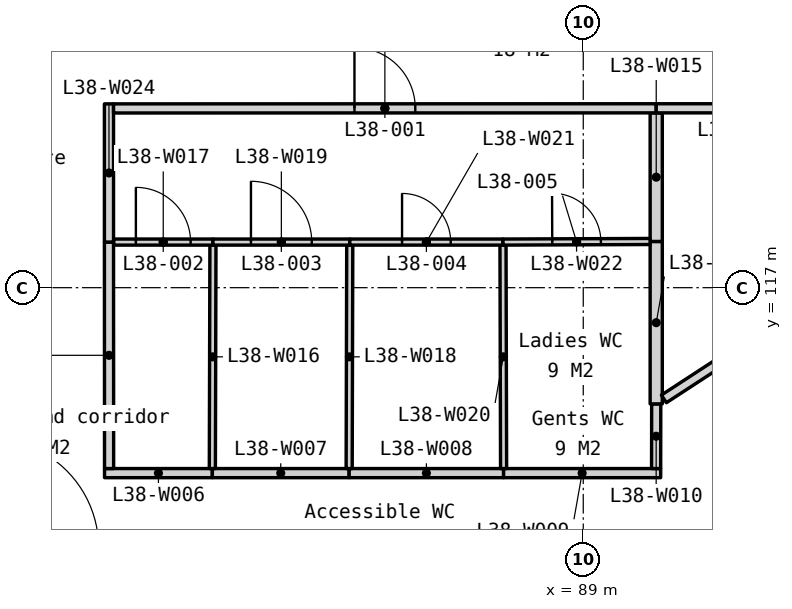
"""IFC4 building model, lengths in metres.
Left out: names, types, materials, properties, quantities, classifications, styles, units other than length and angle.
Written with IfcOpenShell. Run it as: python <this file> out.ifc"""

import sys

from ifc_helpers import new_model, si_unit, direction, frame, frame_2d, origin, place, context, subcontext, project, spatial, polyline, rectangle, outline, extrude, element, fill, save


model = new_model("IFC4")
c1 = context("Model", 3, precision=1e-05, world=origin(), true_north=direction((0.0, 1.0)))
c2 = subcontext(c1, "Body", "Model", "MODEL_VIEW")
j1 = project(units=[si_unit("LENGTHUNIT", "METRE"), si_unit("PLANEANGLEUNIT", "RADIAN")], contexts=[c1])
p1 = place(None, origin())
s1 = spatial("IfcSite", under=j1, at=p1, CompositionType="ELEMENT")
p2 = place(p1, origin())
s2 = spatial("IfcBuilding", under=s1, at=p2, CompositionType="ELEMENT")
p3 = place(p2, frame((0.0, 0.0, 152.0)))
s3 = spatial("IfcBuildingStorey", under=s2, at=p3, CompositionType="ELEMENT", Elevation=152.0)
p4 = place(p3, frame((82.105, 96.067, -0.15), z_axis=(0.0, 0.0, 1.0), x_axis=(0.499997369791, 0.866026922331, 0.0)))
e1 = element("IfcWall", 1, at=p4, inside=s3, PredefinedType="SOLIDWALL", context=c2, shape_type="SweptSolid", body=[
    extrude(outline(polyline([(40.486, 0.0), (40.486, 3.9), (0.0, 3.9), (0.0, 0.0), (40.486, 0.0)])), frame((0.0, 0.225, 0.0), z_axis=(0.0, -1.0, 0.0), x_axis=(1.0, 0.0, 0.0)), (0.0, 0.0, 1.0), 0.45),
])
p5 = place(p4, frame((0.87, 0.0, 0.95)))
e2 = element("IfcOpeningElement", 2, at=p5, cuts=e1, PredefinedType="OPENING", context=c2, shape_type="SweptSolid", body=[
    extrude(rectangle(XDim=1.2, YDim=2.2, at=frame_2d((0.6, 1.1))), frame((0.0, 0.235, 0.0), z_axis=(0.0, -1.0, 0.0), x_axis=(1.0, 0.0, 0.0)), (0.0, 0.0, 1.0), 0.47),
])
p6 = place(p4, frame((8.072, 0.0, 0.95)))
e3 = element("IfcOpeningElement", 3, at=p6, cuts=e1, PredefinedType="OPENING", context=c2, shape_type="SweptSolid", body=[
    extrude(rectangle(XDim=1.8, YDim=2.2, at=frame_2d((0.9, 1.1))), frame((0.0, 0.235, 0.0), z_axis=(0.0, -1.0, 0.0), x_axis=(1.0, 0.0, 0.0)), (0.0, 0.0, 1.0), 0.47),
])
p7 = place(p4, frame((10.372, 0.0, 0.95)))
e4 = element("IfcOpeningElement", 4, at=p7, cuts=e1, PredefinedType="OPENING", context=c2, shape_type="SweptSolid", body=[
    extrude(rectangle(XDim=1.8, YDim=2.2, at=frame_2d((0.9, 1.1))), frame((0.0, 0.235, 0.0), z_axis=(0.0, -1.0, 0.0), x_axis=(1.0, 0.0, 0.0)), (0.0, 0.0, 1.0), 0.47),
])
p8 = place(p4, frame((18.193, 0.0, 0.95)))
e5 = element("IfcOpeningElement", 5, at=p8, cuts=e1, PredefinedType="OPENING", context=c2, shape_type="SweptSolid", body=[
    extrude(rectangle(XDim=1.8, YDim=2.2, at=frame_2d((0.9, 1.1))), frame((0.0, 0.235, 0.0), z_axis=(0.0, -1.0, 0.0), x_axis=(1.0, 0.0, 0.0)), (0.0, 0.0, 1.0), 0.47),
])
p9 = place(p4, frame((20.493, 0.0, 0.95)))
e6 = element("IfcOpeningElement", 6, at=p9, cuts=e1, PredefinedType="OPENING", context=c2, shape_type="SweptSolid", body=[
    extrude(rectangle(XDim=1.8, YDim=2.2, at=frame_2d((0.9, 1.1))), frame((0.0, 0.235, 0.0), z_axis=(0.0, -1.0, 0.0), x_axis=(1.0, 0.0, 0.0)), (0.0, 0.0, 1.0), 0.47),
])
p10 = place(p4, frame((28.315, 0.0, 0.95)))
e7 = element("IfcOpeningElement", 7, at=p10, cuts=e1, PredefinedType="OPENING", context=c2, shape_type="SweptSolid", body=[
    extrude(rectangle(XDim=1.8, YDim=2.2, at=frame_2d((0.9, 1.1))), frame((0.0, 0.235, 0.0), z_axis=(0.0, -1.0, 0.0), x_axis=(1.0, 0.0, 0.0)), (0.0, 0.0, 1.0), 0.47),
])
p11 = place(p4, frame((30.615, 0.0, 0.95)))
e8 = element("IfcOpeningElement", 8, at=p11, cuts=e1, PredefinedType="OPENING", context=c2, shape_type="SweptSolid", body=[
    extrude(rectangle(XDim=1.8, YDim=2.2, at=frame_2d((0.9, 1.1))), frame((0.0, 0.235, 0.0), z_axis=(0.0, -1.0, 0.0), x_axis=(1.0, 0.0, 0.0)), (0.0, 0.0, 1.0), 0.47),
])
p12 = place(p4, frame((38.417, 0.0, 0.95)))
e9 = element("IfcOpeningElement", 9, at=p12, cuts=e1, PredefinedType="OPENING", context=c2, shape_type="SweptSolid", body=[
    extrude(rectangle(XDim=1.2, YDim=2.2, at=frame_2d((0.6, 1.1))), frame((0.0, 0.235, 0.0), z_axis=(0.0, -1.0, 0.0), x_axis=(1.0, 0.0, 0.0)), (0.0, 0.0, 1.0), 0.47),
])
p13 = place(p3, frame((81.127, 113.95, 0.0), z_axis=(0.0, 0.0, 1.0), x_axis=(1.0, 0.0, 0.0)))
e10 = element("IfcWall", 10, at=p13, inside=s3, PredefinedType="PARTITIONING", context=c2, shape_type="SweptSolid", body=[
    extrude(rectangle(XDim=1.773, YDim=0.15, at=frame_2d((0.886, 0.0))), origin(), (0.0, 0.0, 1.0), 3.75),
])
p14 = place(p3, frame((82.9, 113.95, 0.0), z_axis=(0.0, 0.0, 1.0), x_axis=(1.0, 0.0, 0.0)))
e11 = element("IfcWall", 11, at=p14, inside=s3, PredefinedType="PARTITIONING", context=c2, shape_type="SweptSolid", body=[
    extrude(rectangle(XDim=2.25, YDim=0.15, at=frame_2d((1.125, 0.0))), origin(), (0.0, 0.0, 1.0), 3.75),
])
p15 = place(p3, frame((85.15, 113.95, 0.0), z_axis=(0.0, 0.0, 1.0), x_axis=(1.0, 0.0, 0.0)))
e12 = element("IfcWall", 12, at=p15, inside=s3, PredefinedType="PARTITIONING", context=c2, shape_type="SweptSolid", body=[
    extrude(rectangle(XDim=2.54, YDim=0.15, at=frame_2d((1.27, 0.0))), origin(), (0.0, 0.0, 1.0), 3.75),
])
p16 = place(p3, frame((87.69, 113.95, 0.0), z_axis=(0.0, 0.0, 1.0), x_axis=(1.0, 0.0, 0.0)))
e13 = element("IfcWall", 13, at=p16, inside=s3, PredefinedType="PARTITIONING", context=c2, shape_type="SweptSolid", body=[
    extrude(rectangle(XDim=2.583, YDim=0.15, at=frame_2d((1.292, 0.0))), origin(), (0.0, 0.0, 1.0), 3.75),
])
p17 = place(p3, frame((90.198, 114.025, 0.0), z_axis=(0.0, 0.0, 1.0), x_axis=(0.001606976805, 0.999998708812, 0.0)))
e14 = element("IfcWall", 14, at=p17, inside=s3, PredefinedType="PARTITIONING", context=c2, shape_type="SweptSolid", body=[
    extrude(rectangle(XDim=1.063, YDim=0.15, at=frame_2d((0.532, 0.0))), origin(), (0.0, 0.0, 1.0), 3.75),
])
p18 = place(p3, frame((90.2, 115.088, 0.0), z_axis=(0.0, 0.0, 1.0), x_axis=(0.0, 1.0, 0.0)))
e15 = element("IfcWall", 15, at=p18, inside=s3, PredefinedType="PARTITIONING", context=c2, shape_type="SweptSolid", body=[
    extrude(rectangle(XDim=2.672, YDim=0.2, at=frame_2d((1.336, 0.0))), origin(), (0.0, 0.0, 1.0), 3.75),
])
p19 = place(p3, frame((90.326, 115.17, 0.0), z_axis=(0.0, 0.0, 1.0), x_axis=(0.837619592687, 0.546253986665, 0.0)))
e16 = element("IfcWall", 16, at=p19, inside=s3, PredefinedType="PARTITIONING", context=c2, shape_type="SweptSolid", body=[
    extrude(rectangle(XDim=4.859, YDim=0.15, at=frame_2d((2.43, 0.0))), origin(), (0.0, 0.0, 1.0), 3.75),
])
p20 = place(p19, frame((1.93, 0.0, 0.0)))
e17 = element("IfcOpeningElement", 17, at=p20, cuts=e16, PredefinedType="OPENING", context=c2, shape_type="SweptSolid", body=[
    extrude(rectangle(XDim=1.0, YDim=2.1, at=frame_2d((0.5, 1.05))), frame((0.0, 0.085, 0.0), z_axis=(0.0, -1.0, 0.0), x_axis=(1.0, 0.0, 0.0)), (0.0, 0.0, 1.0), 0.17),
])
p21 = place(p3, frame((90.2, 117.76, 0.0), z_axis=(0.0, 0.0, 1.0), x_axis=(0.0, 1.0, 0.0)))
e18 = element("IfcWall", 18, at=p21, inside=s3, PredefinedType="PARTITIONING", context=c2, shape_type="SweptSolid", body=[
    extrude(rectangle(XDim=2.115, YDim=0.2, at=frame_2d((1.058, 0.0))), origin(), (0.0, 0.0, 1.0), 3.75),
])
p22 = place(p3, frame((82.9, 114.025, 0.0), z_axis=(0.0, 0.0, 1.0), x_axis=(0.002657268237, 0.999996469457, 0.0)))
e19 = element("IfcWall", 19, at=p22, inside=s3, PredefinedType="PARTITIONING", context=c2, shape_type="SweptSolid", body=[
    extrude(rectangle(XDim=3.675, YDim=0.1, at=frame_2d((1.837, 0.0))), origin(), (0.0, 0.0, 1.0), 3.75),
])
p23 = place(p3, frame((81.275, 117.75, 0.0), z_axis=(0.0, 0.0, 1.0), x_axis=(1.0, 0.0, 0.0)))
e20 = element("IfcWall", 20, at=p23, inside=s3, PredefinedType="PARTITIONING", context=c2, shape_type="SweptSolid", body=[
    extrude(rectangle(XDim=1.635, YDim=0.1, at=frame_2d((0.817, 0.0))), origin(), (0.0, 0.0, 1.0), 3.75),
])
p24 = place(p23, frame((0.367, 0.0, 0.0)))
e21 = element("IfcOpeningElement", 21, at=p24, cuts=e20, PredefinedType="OPENING", context=c2, shape_type="SweptSolid", body=[
    extrude(rectangle(XDim=0.9, YDim=2.1, at=frame_2d((0.45, 1.05))), frame((0.0, 0.06, 0.0), z_axis=(0.0, -1.0, 0.0), x_axis=(1.0, 0.0, 0.0)), (0.0, 0.0, 1.0), 0.12),
])
p25 = place(p3, frame((85.15, 114.025, 0.0), z_axis=(0.0, 0.0, 1.0), x_axis=(0.002657268237, 0.999996469457, 0.0)))
e22 = element("IfcWall", 22, at=p25, inside=s3, PredefinedType="PARTITIONING", context=c2, shape_type="SweptSolid", body=[
    extrude(rectangle(XDim=3.675, YDim=0.1, at=frame_2d((1.837, 0.0))), origin(), (0.0, 0.0, 1.0), 3.75),
])
p26 = place(p3, frame((82.91, 117.75, 0.0), z_axis=(0.0, 0.0, 1.0), x_axis=(1.0, 0.0, 0.0)))
e23 = element("IfcWall", 23, at=p26, inside=s3, PredefinedType="PARTITIONING", context=c2, shape_type="SweptSolid", body=[
    extrude(rectangle(XDim=2.25, YDim=0.1, at=frame_2d((1.125, 0.0))), origin(), (0.0, 0.0, 1.0), 3.75),
])
p27 = place(p26, frame((0.625, 0.0, 0.0)))
e24 = element("IfcOpeningElement", 24, at=p27, cuts=e23, PredefinedType="OPENING", context=c2, shape_type="SweptSolid", body=[
    extrude(rectangle(XDim=1.0, YDim=2.1, at=frame_2d((0.5, 1.05))), frame((0.0, 0.06, 0.0), z_axis=(0.0, -1.0, 0.0), x_axis=(1.0, 0.0, 0.0)), (0.0, 0.0, 1.0), 0.12),
])
p28 = place(p3, frame((87.69, 114.025, 0.0), z_axis=(0.0, 0.0, 1.0), x_axis=(-0.002590836983, 0.999996643776, 0.0)))
e25 = element("IfcWall", 25, at=p28, inside=s3, PredefinedType="PARTITIONING", context=c2, shape_type="SweptSolid", body=[
    extrude(rectangle(XDim=3.675, YDim=0.1, at=frame_2d((1.837, 0.0))), origin(), (0.0, 0.0, 1.0), 3.75),
])
p29 = place(p3, frame((85.16, 117.75, 0.0), z_axis=(0.0, 0.0, 1.0), x_axis=(1.0, 0.0, 0.0)))
e26 = element("IfcWall", 26, at=p29, inside=s3, PredefinedType="PARTITIONING", context=c2, shape_type="SweptSolid", body=[
    extrude(rectangle(XDim=2.52, YDim=0.1, at=frame_2d((1.26, 0.0))), origin(), (0.0, 0.0, 1.0), 3.75),
])
p30 = place(p29, frame((0.86, 0.0, 0.0)))
e27 = element("IfcOpeningElement", 27, at=p30, cuts=e26, PredefinedType="OPENING", context=c2, shape_type="SweptSolid", body=[
    extrude(rectangle(XDim=0.8, YDim=2.1, at=frame_2d((0.4, 1.05))), frame((0.0, 0.06, 0.0), z_axis=(0.0, -1.0, 0.0), x_axis=(1.0, 0.0, 0.0)), (0.0, 0.0, 1.0), 0.12),
])
p31 = place(p3, frame((87.68, 117.75, 0.0), z_axis=(0.0, 0.0, 1.0), x_axis=(0.999992261016, 0.003934197335, 0.0)))
e28 = element("IfcWall", 28, at=p31, inside=s3, PredefinedType="PARTITIONING", context=c2, shape_type="SweptSolid", body=[
    extrude(rectangle(XDim=2.42, YDim=0.1, at=frame_2d((1.21, 0.0))), origin(), (0.0, 0.0, 1.0), 3.75),
])
p32 = place(p31, frame((0.81, 0.0, 0.0)))
e29 = element("IfcOpeningElement", 29, at=p32, cuts=e28, PredefinedType="OPENING", context=c2, shape_type="SweptSolid", body=[
    extrude(rectangle(XDim=0.8, YDim=2.1, at=frame_2d((0.4, 1.05))), frame((0.0, 0.06, 0.0), z_axis=(0.0, -1.0, 0.0), x_axis=(1.0, 0.0, 0.0)), (0.0, 0.0, 1.0), 0.12),
])
p33 = place(p3, frame((81.202, 114.025, 0.0), z_axis=(0.0, 0.0, 1.0), x_axis=(-0.000524315041, 0.999999862547, 0.0)))
e30 = element("IfcWall", 30, at=p33, inside=s3, PredefinedType="PARTITIONING", context=c2, shape_type="SweptSolid", body=[
    extrude(rectangle(XDim=3.725, YDim=0.15, at=frame_2d((1.863, 0.0))), origin(), (0.0, 0.0, 1.0), 3.75),
])
p34 = place(p3, frame((81.2, 117.75, 0.0), z_axis=(0.0, 0.0, 1.0), x_axis=(0.0, 1.0, 0.0)))
e31 = element("IfcWall", 31, at=p34, inside=s3, PredefinedType="PARTITIONING", context=c2, shape_type="SweptSolid", body=[
    extrude(rectangle(XDim=2.273, YDim=0.15, at=frame_2d((1.136, 0.0))), origin(), (0.0, 0.0, 1.0), 3.75),
])
p35 = place(p3, frame((81.275, 119.948, 0.0), z_axis=(0.0, 0.0, 1.0), x_axis=(0.999999976055, 0.000218836333, 0.0)))
e32 = element("IfcWall", 32, at=p35, inside=s3, PredefinedType="PARTITIONING", context=c2, shape_type="SweptSolid", body=[
    extrude(rectangle(XDim=8.925, YDim=0.15, at=frame_2d((4.462, 0.0))), origin(), (0.0, 0.0, 1.0), 3.75),
])
p36 = place(p35, frame((3.962, 0.0, 0.0)))
e33 = element("IfcOpeningElement", 33, at=p36, cuts=e32, PredefinedType="OPENING", context=c2, shape_type="SweptSolid", body=[
    extrude(rectangle(XDim=1.0, YDim=2.1, at=frame_2d((0.5, 1.05))), frame((0.0, 0.085, 0.0), z_axis=(0.0, -1.0, 0.0), x_axis=(1.0, 0.0, 0.0)), (0.0, 0.0, 1.0), 0.17),
])
p37 = place(p3, frame((90.2, 119.95, 0.0), z_axis=(0.0, 0.0, 1.0), x_axis=(1.0, 0.0, 0.0)))
e34 = element("IfcWall", 34, at=p37, inside=s3, PredefinedType="PARTITIONING", context=c2, shape_type="SweptSolid", body=[
    extrude(rectangle(XDim=2.875, YDim=0.15, at=frame_2d((1.438, 0.0))), origin(), (0.0, 0.0, 1.0), 3.75),
])
p38 = place(p36, origin())
e35 = element("IfcDoor", 35, at=p38, inside=s3, OperationType="SINGLE_SWING_LEFT", PredefinedType="DOOR", context=c2, shape_type="SweptSolid", body=[
    extrude(rectangle(XDim=1.0, YDim=2.1, at=frame_2d((0.5, 1.05))), frame((0.0, 0.025, 0.0), z_axis=(0.0, -1.0, 0.0), x_axis=(1.0, 0.0, 0.0)), (0.0, 0.0, 1.0), 0.05),
])
fill(e33, e35)
p39 = place(p24, origin())
e36 = element("IfcDoor", 36, at=p39, inside=s3, OperationType="SINGLE_SWING_LEFT", PredefinedType="DOOR", context=c2, shape_type="SweptSolid", body=[
    extrude(rectangle(XDim=0.9, YDim=2.1, at=frame_2d((0.45, 1.05))), frame((0.0, 0.025, 0.0), z_axis=(0.0, -1.0, 0.0), x_axis=(1.0, 0.0, 0.0)), (0.0, 0.0, 1.0), 0.05),
])
fill(e21, e36)
p40 = place(p27, origin())
e37 = element("IfcDoor", 37, at=p40, inside=s3, OperationType="SINGLE_SWING_LEFT", PredefinedType="DOOR", context=c2, shape_type="SweptSolid", body=[
    extrude(rectangle(XDim=1.0, YDim=2.1, at=frame_2d((0.5, 1.05))), frame((0.0, 0.025, 0.0), z_axis=(0.0, -1.0, 0.0), x_axis=(1.0, 0.0, 0.0)), (0.0, 0.0, 1.0), 0.05),
])
fill(e24, e37)
p41 = place(p30, origin())
e38 = element("IfcDoor", 38, at=p41, inside=s3, OperationType="SINGLE_SWING_LEFT", PredefinedType="DOOR", context=c2, shape_type="SweptSolid", body=[
    extrude(rectangle(XDim=0.8, YDim=2.1, at=frame_2d((0.4, 1.05))), frame((0.0, 0.025, 0.0), z_axis=(0.0, -1.0, 0.0), x_axis=(1.0, 0.0, 0.0)), (0.0, 0.0, 1.0), 0.05),
])
fill(e27, e38)
p42 = place(p32, origin())
e39 = element("IfcDoor", 39, at=p42, inside=s3, OperationType="SINGLE_SWING_LEFT", PredefinedType="DOOR", context=c2, shape_type="SweptSolid", body=[
    extrude(rectangle(XDim=0.8, YDim=2.1, at=frame_2d((0.4, 1.05))), frame((0.0, 0.025, 0.0), z_axis=(0.0, -1.0, 0.0), x_axis=(1.0, 0.0, 0.0)), (0.0, 0.0, 1.0), 0.05),
])
fill(e29, e39)
save(model, sys.argv[1])
